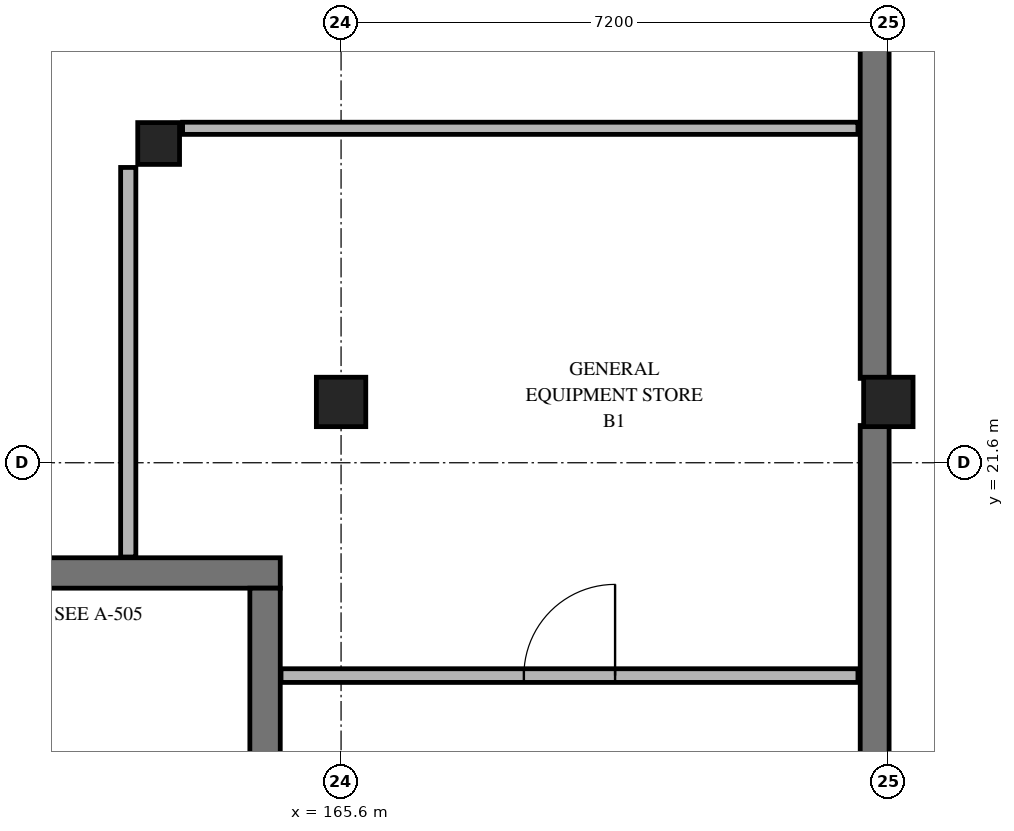
"""IFC4 building model, lengths in metres.
Left out: names, types, materials, properties, quantities, classifications, styles, units other than length and angle.
Written with IfcOpenShell. Run it as: python <this file> out.ifc"""

import sys

from ifc_helpers import new_model, si_unit, direction, frame, frame_2d, origin, origin_2d, place, context, subcontext, project, spatial, rectangle, extrude, element, fill, save


model = new_model("IFC4")
c1 = context("Model", 3, precision=1e-05, world=origin(), true_north=direction((0.0, 1.0)))
c2 = subcontext(c1, "Body", "Model", "MODEL_VIEW")
j1 = project(units=[si_unit("LENGTHUNIT", "METRE"), si_unit("PLANEANGLEUNIT", "RADIAN")], contexts=[c1])
p1 = place(None, origin())
s1 = spatial("IfcSite", under=j1, at=p1, CompositionType="ELEMENT")
p2 = place(p1, origin())
s2 = spatial("IfcBuilding", under=s1, at=p2, CompositionType="ELEMENT")
p3 = place(p2, frame((0.0, 0.0, -4.2)))
s3 = spatial("IfcBuildingStorey", under=s2, at=p3, CompositionType="ELEMENT", Elevation=-4.2)
for number, where, z_axis, x_axis in (
    (1, (165.6, 22.4, 0.0), (0.0, 0.0, 1.0), (1.0, 0.0, 0.0)),
    (2, (172.8, 22.4, 0.0), (0.0, 0.0, 1.0), (1.0, 0.0, 0.0)),
):
    element("IfcColumn", number, at=place(p3, frame(where, z_axis=z_axis, x_axis=x_axis)), inside=s3, PredefinedType="COLUMN", context=c2, shape_type="SweptSolid", body=[
        extrude(rectangle(XDim=0.65, YDim=0.65, at=origin_2d()), origin(), (0.0, 0.0, 1.0), 4.2),
    ])
p4 = place(p3, frame((163.2, 25.8, 0.0), z_axis=(0.0, 0.0, 1.0), x_axis=(1.0, 0.0, 0.0)))
e3 = element("IfcColumn", 3, at=p4, inside=s3, PredefinedType="COLUMN", context=c2, shape_type="SweptSolid", body=[
    extrude(rectangle(XDim=0.55, YDim=0.55, at=origin_2d()), origin(), (0.0, 0.0, 1.0), 4.2),
])
p5 = place(p3, frame((172.62, 28.115, 0.0), z_axis=(0.0, 0.0, 1.0), x_axis=(0.0, -1.0, 0.0)))
e4 = element("IfcWall", 4, at=p5, inside=s3, PredefinedType="SOLIDWALL", context=c2, shape_type="SweptSolid", body=[
    extrude(rectangle(XDim=5.405, YDim=0.38, at=frame_2d((2.703, 0.0))), origin(), (0.0, 0.0, 1.0), 3.92),
])
p6 = place(p3, frame((172.62, 22.09, 0.0), z_axis=(0.0, 0.0, 1.0), x_axis=(0.0, -1.0, 0.0)))
e5 = element("IfcWall", 5, at=p6, inside=s3, PredefinedType="SOLIDWALL", context=c2, shape_type="SweptSolid", body=[
    extrude(rectangle(XDim=7.627, YDim=0.38, at=frame_2d((3.813, 0.0))), origin(), (0.0, 0.0, 1.0), 3.92),
])
p7 = place(p3, frame((164.8, 20.15, 0.0), z_axis=(0.0, 0.0, 1.0), x_axis=(-1.0, 0.0, 0.0)))
e6 = element("IfcWall", 6, at=p7, inside=s3, PredefinedType="SHEAR", context=c2, shape_type="SweptSolid", body=[
    extrude(rectangle(XDim=9.2, YDim=0.4, at=frame_2d((4.6, 0.0))), origin(), (0.0, 0.0, 1.0), 3.92),
])
p8 = place(p3, frame((164.6, 16.2, 0.0), z_axis=(0.0, 0.0, 1.0), x_axis=(0.0, 1.0, 0.0)))
e7 = element("IfcWall", 7, at=p8, inside=s3, PredefinedType="SHEAR", context=c2, shape_type="SweptSolid", body=[
    extrude(rectangle(XDim=3.75, YDim=0.4, at=frame_2d((1.875, 0.0))), origin(), (0.0, 0.0, 1.0), 3.92),
])
p9 = place(p3, frame((164.81, 18.8, 0.0), z_axis=(0.0, 0.0, 1.0), x_axis=(1.0, 0.0, 0.0)))
e8 = element("IfcWall", 8, at=p9, inside=s3, PredefinedType="PARTITIONING", context=c2, shape_type="SweptSolid", body=[
    extrude(rectangle(XDim=7.59, YDim=0.18, at=frame_2d((3.795, 0.0))), origin(), (0.0, 0.0, 1.0), 3.12),
])
p10 = place(p9, frame((3.195, 0.0, 0.0)))
e9 = element("IfcOpeningElement", 9, at=p10, cuts=e8, PredefinedType="OPENING", context=c2, shape_type="SweptSolid", body=[
    extrude(rectangle(XDim=1.2, YDim=2.2, at=frame_2d((0.6, 1.1))), frame((0.0, 0.1, 0.0), z_axis=(0.0, -1.0, 0.0), x_axis=(1.0, 0.0, 0.0)), (0.0, 0.0, 1.0), 0.2),
])
p11 = place(p3, frame((172.4, 26.0, 0.0), z_axis=(0.0, 0.0, 1.0), x_axis=(-1.0, 0.0, 0.0)))
e10 = element("IfcWall", 10, at=p11, inside=s3, PredefinedType="PARTITIONING", context=c2, shape_type="SweptSolid", body=[
    extrude(rectangle(XDim=8.885, YDim=0.16, at=frame_2d((4.442, 0.0))), origin(), (0.0, 0.0, 1.0), 3.02),
])
p12 = place(p3, frame((162.8, 25.485, 0.0), z_axis=(0.0, 0.0, 1.0), x_axis=(0.0, -1.0, 0.0)))
e11 = element("IfcWall", 11, at=p12, inside=s3, PredefinedType="PARTITIONING", context=c2, shape_type="SweptSolid", body=[
    extrude(rectangle(XDim=5.125, YDim=0.2, at=frame_2d((2.562, 0.0))), origin(), (0.0, 0.0, 1.0), 3.02),
])
p13 = place(p10, origin())
e12 = element("IfcDoor", 12, at=p13, inside=s3, OperationType="SINGLE_SWING_RIGHT", PredefinedType="DOOR", context=c2, shape_type="SweptSolid", body=[
    extrude(rectangle(XDim=1.2, YDim=2.2, at=frame_2d((0.6, 1.1))), frame((0.0, 0.025, 0.0), z_axis=(0.0, -1.0, 0.0), x_axis=(1.0, 0.0, 0.0)), (0.0, 0.0, 1.0), 0.05),
])
fill(e9, e12)
save(model, sys.argv[1])
